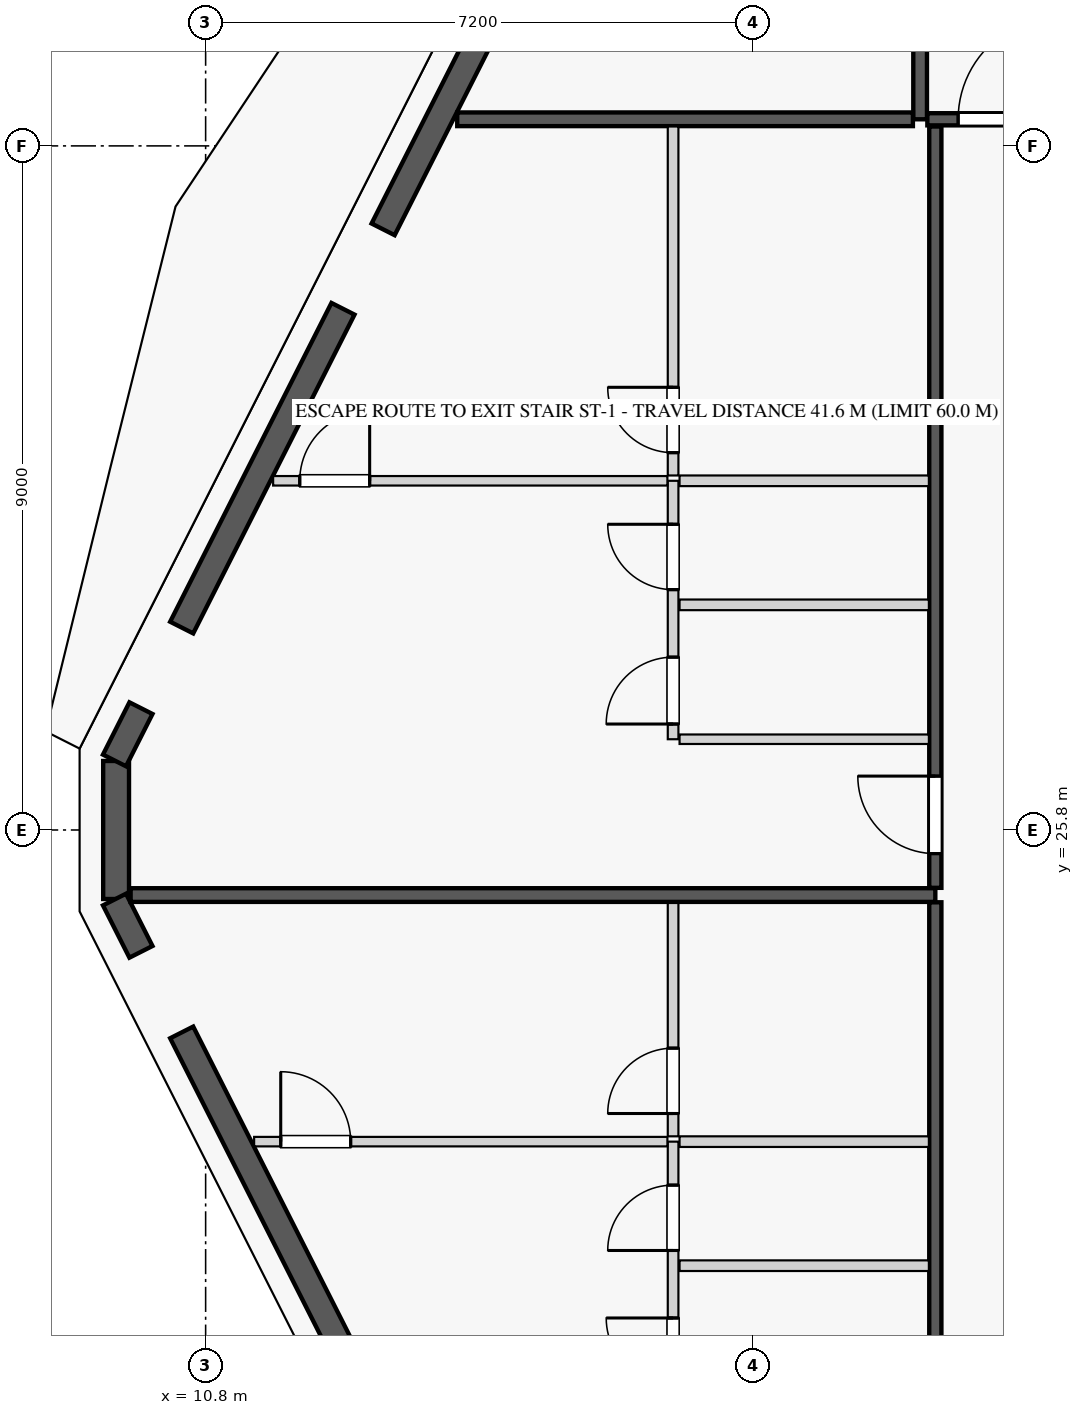
"""IFC4 building model, lengths in metres.
Left out: names, types, materials, properties, quantities, classifications, styles, units other than length and angle.
Written with IfcOpenShell. Run it as: python <this file> out.ifc"""

import sys

from ifc_helpers import new_model, si_unit, direction, frame, frame_2d, origin, origin_2d, place, context, subcontext, project, spatial, rectangle, extrude, element, fill, save


model = new_model("IFC4")
c1 = context("Model", 3, precision=1e-05, world=origin(), true_north=direction((0.0, 1.0)))
c2 = subcontext(c1, "Body", "Model", "MODEL_VIEW")
j1 = project(units=[si_unit("LENGTHUNIT", "METRE"), si_unit("PLANEANGLEUNIT", "RADIAN")], contexts=[c1])
p1 = place(None, origin())
s1 = spatial("IfcSite", under=j1, at=p1, CompositionType="ELEMENT")
p2 = place(p1, origin())
s2 = spatial("IfcBuilding", under=s1, at=p2, CompositionType="ELEMENT")
p3 = place(p2, frame((0.0, 0.0, 186.1)))
s3 = spatial("IfcBuildingStorey", under=s2, at=p3, CompositionType="ELEMENT", Elevation=186.1)
for number, where, z_axis, x_axis in (
    (1, (12.942, 33.171, 0.0), (0.0, 0.0, 1.0), (1.0, 0.0, 0.0)),
    (2, (10.253, 27.932, 0.0), (0.0, 0.0, 1.0), (1.0, 0.0, 0.0)),
    (3, (10.253, 23.668, 0.0), (0.0, 0.0, 1.0), (1.0, 0.0, 0.0)),
):
    element("IfcColumn", number, at=place(p3, frame(where, z_axis=z_axis, x_axis=x_axis)), inside=s3, PredefinedType="COLUMN", context=c2, shape_type="SweptSolid", body=[
        extrude(rectangle(XDim=0.9, YDim=0.9, at=origin_2d()), origin(), (0.0, 0.0, 1.0), 3.55),
    ])
p4 = place(p3, frame((10.253, 25.8, 0.0), z_axis=(0.0, 0.0, 1.0), x_axis=(0.0, -1.0, 0.0)))
e4 = element("IfcColumn", 4, at=p4, inside=s3, PredefinedType="PILASTER", context=c2, shape_type="SweptSolid", body=[
    extrude(rectangle(XDim=0.5, YDim=0.35, at=origin_2d()), origin(), (0.0, 0.0, 1.0), 3.55),
])
p5 = place(p3, frame((9.622, 26.708, 0.0), z_axis=(0.0, 0.0, 1.0), x_axis=(0.0, -1.0, 0.0)))
e5 = element("IfcWall", 5, at=p5, inside=s3, PredefinedType="STANDARD", context=c2, shape_type="SweptSolid", body=[
    extrude(rectangle(XDim=1.816, YDim=0.34, at=frame_2d((0.908, 0.0))), origin(), (0.0, 0.0, 1.0), 3.35),
])
p6 = place(p3, frame((15.352, 38.083, 0.0), z_axis=(0.0, 0.0, 1.0), x_axis=(-0.451524246964, -0.89225884944, 0.0)))
e6 = element("IfcWall", 6, at=p6, inside=s3, PredefinedType="STANDARD", context=c2, shape_type="SweptSolid", body=[
    extrude(rectangle(XDim=4.91, YDim=0.34, at=frame_2d((2.455, 0.0))), origin(), (0.0, 0.0, 1.0), 2.883),
])
p7 = place(p6, frame((0.968, 0.0, 0.0)))
e7 = element("IfcOpeningElement", 7, at=p7, cuts=e6, PredefinedType="OPENING", context=c2, shape_type="SweptSolid", body=[
    extrude(rectangle(XDim=1.1, YDim=2.25, at=frame_2d((0.55, 1.125))), frame((0.0, 0.18, 0.0), z_axis=(0.0, -1.0, 0.0), x_axis=(1.0, 0.0, 0.0)), (0.0, 0.0, 1.0), 0.36),
])
p8 = place(p6, frame((3.569, 0.0, 0.75)))
e8 = element("IfcOpeningElement", 8, at=p8, cuts=e6, PredefinedType="OPENING", context=c2, shape_type="SweptSolid", body=[
    extrude(rectangle(XDim=1.1, YDim=1.983, at=frame_2d((0.55, 0.991))), frame((0.0, 0.18, 0.0), z_axis=(0.0, -1.0, 0.0), x_axis=(1.0, 0.0, 0.0)), (0.0, 0.0, 1.0), 0.36),
])
p9 = place(p3, frame((12.607, 32.657, 0.0), z_axis=(0.0, 0.0, 1.0), x_axis=(-0.451426298588, -0.892308409096, 0.0)))
e9 = element("IfcWall", 9, at=p9, inside=s3, PredefinedType="STANDARD", context=c2, shape_type="SweptSolid", body=[
    extrude(rectangle(XDim=4.7, YDim=0.34, at=frame_2d((2.35, 0.0))), origin(), (0.0, 0.0, 1.0), 2.883),
])
p10 = place(p9, frame((0.607, 0.0, 0.75)))
e10 = element("IfcOpeningElement", 10, at=p10, cuts=e9, PredefinedType="OPENING", context=c2, shape_type="SweptSolid", body=[
    extrude(rectangle(XDim=1.1, YDim=1.983, at=frame_2d((0.55, 0.991))), frame((0.0, 0.18, 0.0), z_axis=(0.0, -1.0, 0.0), x_axis=(1.0, 0.0, 0.0)), (0.0, 0.0, 1.0), 0.36),
])
p11 = place(p9, frame((3.077, 0.0, 0.75)))
e11 = element("IfcOpeningElement", 11, at=p11, cuts=e9, PredefinedType="OPENING", context=c2, shape_type="SweptSolid", body=[
    extrude(rectangle(XDim=1.1, YDim=1.983, at=frame_2d((0.55, 0.991))), frame((0.0, 0.18, 0.0), z_axis=(0.0, -1.0, 0.0), x_axis=(1.0, 0.0, 0.0)), (0.0, 0.0, 1.0), 0.36),
])
for number, where, z_axis, x_axis in (
    (12, (9.949, 27.403, 0.0), (0.0, 0.0, 1.0), (-0.451, -0.892, 0.0)),
    (13, (9.601, 24.885, 0.0), (0.0, 0.0, 1.0), (0.451, -0.892, 0.0)),
):
    element("IfcWall", number, at=place(p3, frame(where, z_axis=z_axis, x_axis=x_axis)), inside=s3, PredefinedType="STANDARD", context=c2, shape_type="SweptSolid", body=[
        extrude(rectangle(XDim=0.771, YDim=0.34, at=frame_2d((0.385, 0.0))), origin(), (0.0, 0.0, 1.0), 3.35),
    ])
p12 = place(p3, frame((10.485, 23.137, 0.0), z_axis=(0.0, 0.0, 1.0), x_axis=(0.451447222193, -0.892297823361, 0.0)))
e14 = element("IfcWall", 14, at=p12, inside=s3, PredefinedType="STANDARD", context=c2, shape_type="SweptSolid", body=[
    extrude(rectangle(XDim=4.7, YDim=0.34, at=frame_2d((2.35, 0.0))), origin(), (0.0, 0.0, 1.0), 2.883),
])
p13 = place(p12, frame((0.246, 0.0, 0.75)))
e15 = element("IfcOpeningElement", 15, at=p13, cuts=e14, PredefinedType="OPENING", context=c2, shape_type="SweptSolid", body=[
    extrude(rectangle(XDim=1.1, YDim=1.983, at=frame_2d((0.55, 0.991))), frame((0.0, 0.18, 0.0), z_axis=(0.0, -1.0, 0.0), x_axis=(1.0, 0.0, 0.0)), (0.0, 0.0, 1.0), 0.36),
])
p14 = place(p12, frame((2.716, 0.0, 0.75)))
e16 = element("IfcOpeningElement", 16, at=p14, cuts=e14, PredefinedType="OPENING", context=c2, shape_type="SweptSolid", body=[
    extrude(rectangle(XDim=1.1, YDim=1.983, at=frame_2d((0.55, 0.991))), frame((0.0, 0.18, 0.0), z_axis=(0.0, -1.0, 0.0), x_axis=(1.0, 0.0, 0.0)), (0.0, 0.0, 1.0), 0.36),
])
p15 = place(p3, frame((20.2, 35.15, 0.0), z_axis=(0.0, 0.0, 1.0), x_axis=(0.0, 1.0, 0.0)))
e17 = element("IfcWall", 17, at=p15, inside=s3, PredefinedType="PARTITIONING", context=c2, shape_type="SweptSolid", body=[
    extrude(rectangle(XDim=10.482, YDim=0.18, at=frame_2d((5.241, 0.0))), origin(), (0.0, 0.0, 1.0), 3.35),
])
p16 = place(p3, frame((20.295, 35.15, 0.0), z_axis=(0.0, 0.0, 1.0), x_axis=(1.0, 0.0, 0.0)))
e18 = element("IfcWall", 18, at=p16, inside=s3, PredefinedType="PARTITIONING", context=c2, shape_type="SweptSolid", body=[
    extrude(rectangle(XDim=24.21, YDim=0.16, at=frame_2d((12.105, 0.0))), origin(), (0.0, 0.0, 1.0), 3.35),
])
p17 = place(p16, frame((0.405, 0.0, 0.0)))
e19 = element("IfcOpeningElement", 19, at=p17, cuts=e18, PredefinedType="OPENING", context=c2, shape_type="SweptSolid", body=[
    extrude(rectangle(XDim=1.35, YDim=2.35, at=frame_2d((0.675, 1.175))), frame((0.0, 0.09, 0.0), z_axis=(0.0, -1.0, 0.0), x_axis=(1.0, 0.0, 0.0)), (0.0, 0.0, 1.0), 0.18),
])
p18 = place(p3, frame((14.11, 35.15, 0.0), z_axis=(0.0, 0.0, 1.0), x_axis=(1.0, 0.0, 0.0)))
e20 = element("IfcWall", 20, at=p18, inside=s3, PredefinedType="PARTITIONING", context=c2, shape_type="SweptSolid", body=[
    extrude(rectangle(XDim=5.995, YDim=0.18, at=frame_2d((2.998, 0.0))), origin(), (0.0, 0.0, 1.0), 3.35),
])
p19 = place(p3, frame((20.4, 16.345, 0.0), z_axis=(0.0, 0.0, 1.0), x_axis=(0.0, 1.0, 0.0)))
e21 = element("IfcWall", 21, at=p19, inside=s3, PredefinedType="PARTITIONING", context=c2, shape_type="SweptSolid", body=[
    extrude(rectangle(XDim=8.504, YDim=0.16, at=frame_2d((4.252, 0.0))), origin(), (0.0, 0.0, 1.0), 3.35),
])
p20 = place(p19, frame((0.45, 0.0, 0.0)))
e22 = element("IfcOpeningElement", 22, at=p20, cuts=e21, PredefinedType="OPENING", context=c2, shape_type="SweptSolid", body=[
    extrude(rectangle(XDim=1.02, YDim=2.25, at=frame_2d((0.51, 1.125))), frame((0.0, 0.09, 0.0), z_axis=(0.0, -1.0, 0.0), x_axis=(1.0, 0.0, 0.0)), (0.0, 0.0, 1.0), 0.18),
])
p21 = place(p3, frame((16.95, 18.3, 0.0), z_axis=(0.0, 0.0, 1.0), x_axis=(0.0, 1.0, 0.0)))
e23 = element("IfcWall", 23, at=p21, inside=s3, PredefinedType="PLUMBINGWALL", context=c2, shape_type="SweptSolid", body=[
    extrude(rectangle(XDim=3.4, YDim=0.14, at=frame_2d((1.7, 0.0))), origin(), (0.0, 0.0, 1.0), 3.35),
])
p22 = place(p21, frame((0.2, 0.0, 0.0)))
e24 = element("IfcOpeningElement", 24, at=p22, cuts=e23, PredefinedType="OPENING", context=c2, shape_type="SweptSolid", body=[
    extrude(rectangle(XDim=0.88, YDim=2.15, at=frame_2d((0.44, 1.075))), frame((0.0, 0.08, 0.0), z_axis=(0.0, -1.0, 0.0), x_axis=(1.0, 0.0, 0.0)), (0.0, 0.0, 1.0), 0.16),
])
p23 = place(p21, frame((1.968, 0.0, 0.0)))
e25 = element("IfcOpeningElement", 25, at=p23, cuts=e23, PredefinedType="OPENING", context=c2, shape_type="SweptSolid", body=[
    extrude(rectangle(XDim=0.86, YDim=2.1, at=frame_2d((0.43, 1.05))), frame((0.0, 0.08, 0.0), z_axis=(0.0, -1.0, 0.0), x_axis=(1.0, 0.0, 0.0)), (0.0, 0.0, 1.0), 0.16),
])
p24 = place(p3, frame((16.95, 21.77, 0.0), z_axis=(0.0, 0.0, 1.0), x_axis=(0.0, 1.0, 0.0)))
e26 = element("IfcWall", 26, at=p24, inside=s3, PredefinedType="PLUMBINGWALL", context=c2, shape_type="SweptSolid", body=[
    extrude(rectangle(XDim=3.079, YDim=0.14, at=frame_2d((1.54, 0.0))), origin(), (0.0, 0.0, 1.0), 3.35),
])
p25 = place(p24, frame((0.3, 0.0, 0.0)))
e27 = element("IfcOpeningElement", 27, at=p25, cuts=e26, PredefinedType="OPENING", context=c2, shape_type="SweptSolid", body=[
    extrude(rectangle(XDim=0.86, YDim=2.1, at=frame_2d((0.43, 1.05))), frame((0.0, 0.08, 0.0), z_axis=(0.0, -1.0, 0.0), x_axis=(1.0, 0.0, 0.0)), (0.0, 0.0, 1.0), 0.16),
])
p26 = place(p3, frame((17.035, 21.7, 0.0), z_axis=(0.0, 0.0, 1.0), x_axis=(1.0, 0.0, 0.0)))
e28 = element("IfcWall", 28, at=p26, inside=s3, PredefinedType="PLUMBINGWALL", context=c2, shape_type="SweptSolid", body=[
    extrude(rectangle(XDim=3.28, YDim=0.14, at=frame_2d((1.64, 0.0))), origin(), (0.0, 0.0, 1.0), 3.35),
])
p27 = place(p3, frame((11.438, 21.7, 0.0), z_axis=(0.0, 0.0, 1.0), x_axis=(1.0, 0.0, 0.0)))
e29 = element("IfcWall", 29, at=p27, inside=s3, PredefinedType="PARTITIONING", context=c2, shape_type="SweptSolid", body=[
    extrude(rectangle(XDim=5.437, YDim=0.125, at=frame_2d((2.719, 0.0))), origin(), (0.0, 0.0, 1.0), 3.35),
])
p28 = place(p27, frame((0.35, 0.0, 0.0)))
e30 = element("IfcOpeningElement", 30, at=p28, cuts=e29, PredefinedType="OPENING", context=c2, shape_type="SweptSolid", body=[
    extrude(rectangle(XDim=0.92, YDim=2.15, at=frame_2d((0.46, 1.075))), frame((0.0, 0.073, 0.0), z_axis=(0.0, -1.0, 0.0), x_axis=(1.0, 0.0, 0.0)), (0.0, 0.0, 1.0), 0.145),
])
p29 = place(p3, frame((17.035, 20.068, 0.0), z_axis=(0.0, 0.0, 1.0), x_axis=(1.0, 0.0, 0.0)))
e31 = element("IfcWall", 31, at=p29, inside=s3, PredefinedType="PLUMBINGWALL", context=c2, shape_type="SweptSolid", body=[
    extrude(rectangle(XDim=3.28, YDim=0.14, at=frame_2d((1.64, 0.0))), origin(), (0.0, 0.0, 1.0), 3.35),
])
p30 = place(p3, frame((9.813, 24.944, 0.0), z_axis=(0.0, 0.0, 1.0), x_axis=(1.0, 0.0, 0.0)))
e32 = element("IfcWall", 32, at=p30, inside=s3, PredefinedType="PARTITIONING", context=c2, shape_type="SweptSolid", body=[
    extrude(rectangle(XDim=10.587, YDim=0.18, at=frame_2d((5.293, 0.0))), origin(), (0.0, 0.0, 1.0), 3.35),
])
p31 = place(p3, frame((20.4, 25.039, 0.0), z_axis=(0.0, 0.0, 1.0), x_axis=(0.0, 1.0, 0.0)))
e33 = element("IfcWall", 33, at=p31, inside=s3, PredefinedType="PARTITIONING", context=c2, shape_type="SweptSolid", body=[
    extrude(rectangle(XDim=10.016, YDim=0.16, at=frame_2d((5.008, 0.0))), origin(), (0.0, 0.0, 1.0), 3.35),
])
p32 = place(p31, frame((0.45, 0.0, 0.0)))
e34 = element("IfcOpeningElement", 34, at=p32, cuts=e33, PredefinedType="OPENING", context=c2, shape_type="SweptSolid", body=[
    extrude(rectangle(XDim=1.02, YDim=2.25, at=frame_2d((0.51, 1.125))), frame((0.0, 0.09, 0.0), z_axis=(0.0, -1.0, 0.0), x_axis=(1.0, 0.0, 0.0)), (0.0, 0.0, 1.0), 0.18),
])
p33 = place(p3, frame((17.035, 26.994, 0.0), z_axis=(0.0, 0.0, 1.0), x_axis=(1.0, 0.0, 0.0)))
e35 = element("IfcWall", 35, at=p33, inside=s3, PredefinedType="PARTITIONING", context=c2, shape_type="SweptSolid", body=[
    extrude(rectangle(XDim=3.28, YDim=0.125, at=frame_2d((1.64, 0.0))), origin(), (0.0, 0.0, 1.0), 3.35),
])
p34 = place(p3, frame((16.95, 26.994, 0.0), z_axis=(0.0, 0.0, 1.0), x_axis=(0.0, 1.0, 0.0)))
e36 = element("IfcWall", 36, at=p34, inside=s3, PredefinedType="PLUMBINGWALL", context=c2, shape_type="SweptSolid", body=[
    extrude(rectangle(XDim=3.4, YDim=0.14, at=frame_2d((1.7, 0.0))), origin(), (0.0, 0.0, 1.0), 3.35),
])
p35 = place(p34, frame((0.2, 0.0, 0.0)))
e37 = element("IfcOpeningElement", 37, at=p35, cuts=e36, PredefinedType="OPENING", context=c2, shape_type="SweptSolid", body=[
    extrude(rectangle(XDim=0.88, YDim=2.15, at=frame_2d((0.44, 1.075))), frame((0.0, 0.08, 0.0), z_axis=(0.0, -1.0, 0.0), x_axis=(1.0, 0.0, 0.0)), (0.0, 0.0, 1.0), 0.16),
])
p36 = place(p34, frame((1.968, 0.0, 0.0)))
e38 = element("IfcOpeningElement", 38, at=p36, cuts=e36, PredefinedType="OPENING", context=c2, shape_type="SweptSolid", body=[
    extrude(rectangle(XDim=0.86, YDim=2.1, at=frame_2d((0.43, 1.05))), frame((0.0, 0.08, 0.0), z_axis=(0.0, -1.0, 0.0), x_axis=(1.0, 0.0, 0.0)), (0.0, 0.0, 1.0), 0.16),
])
p37 = place(p3, frame((16.95, 30.464, 0.0), z_axis=(0.0, 0.0, 1.0), x_axis=(0.0, 1.0, 0.0)))
e39 = element("IfcWall", 39, at=p37, inside=s3, PredefinedType="PLUMBINGWALL", context=c2, shape_type="SweptSolid", body=[
    extrude(rectangle(XDim=4.591, YDim=0.14, at=frame_2d((2.295, 0.0))), origin(), (0.0, 0.0, 1.0), 3.35),
])
p38 = place(p37, frame((0.3, 0.0, 0.0)))
e40 = element("IfcOpeningElement", 40, at=p38, cuts=e39, PredefinedType="OPENING", context=c2, shape_type="SweptSolid", body=[
    extrude(rectangle(XDim=0.86, YDim=2.1, at=frame_2d((0.43, 1.05))), frame((0.0, 0.08, 0.0), z_axis=(0.0, -1.0, 0.0), x_axis=(1.0, 0.0, 0.0)), (0.0, 0.0, 1.0), 0.16),
])
p39 = place(p3, frame((17.035, 30.394, 0.0), z_axis=(0.0, 0.0, 1.0), x_axis=(1.0, 0.0, 0.0)))
e41 = element("IfcWall", 41, at=p39, inside=s3, PredefinedType="PLUMBINGWALL", context=c2, shape_type="SweptSolid", body=[
    extrude(rectangle(XDim=3.28, YDim=0.14, at=frame_2d((1.64, 0.0))), origin(), (0.0, 0.0, 1.0), 3.35),
])
p40 = place(p3, frame((11.688, 30.394, 0.0), z_axis=(0.0, 0.0, 1.0), x_axis=(1.0, 0.0, 0.0)))
e42 = element("IfcWall", 42, at=p40, inside=s3, PredefinedType="PARTITIONING", context=c2, shape_type="SweptSolid", body=[
    extrude(rectangle(XDim=5.187, YDim=0.125, at=frame_2d((2.594, 0.0))), origin(), (0.0, 0.0, 1.0), 3.35),
])
p41 = place(p40, frame((0.35, 0.0, 0.0)))
e43 = element("IfcOpeningElement", 43, at=p41, cuts=e42, PredefinedType="OPENING", context=c2, shape_type="SweptSolid", body=[
    extrude(rectangle(XDim=0.92, YDim=2.15, at=frame_2d((0.46, 1.075))), frame((0.0, 0.073, 0.0), z_axis=(0.0, -1.0, 0.0), x_axis=(1.0, 0.0, 0.0)), (0.0, 0.0, 1.0), 0.145),
])
p42 = place(p3, frame((17.035, 28.762, 0.0), z_axis=(0.0, 0.0, 1.0), x_axis=(1.0, 0.0, 0.0)))
e44 = element("IfcWall", 44, at=p42, inside=s3, PredefinedType="PLUMBINGWALL", context=c2, shape_type="SweptSolid", body=[
    extrude(rectangle(XDim=3.28, YDim=0.14, at=frame_2d((1.64, 0.0))), origin(), (0.0, 0.0, 1.0), 3.35),
])
p43 = place(p10, origin())
e45 = element("IfcWindow", 45, at=p43, inside=s3, PartitioningType="SINGLE_PANEL", PredefinedType="WINDOW", context=c2, shape_type="SweptSolid", body=[
    extrude(rectangle(XDim=1.1, YDim=1.983, at=frame_2d((0.55, 0.991))), frame((0.0, 0.03, 0.0), z_axis=(0.0, -1.0, 0.0), x_axis=(1.0, 0.0, 0.0)), (0.0, 0.0, 1.0), 0.06),
])
fill(e10, e45)
p44 = place(p13, origin())
e46 = element("IfcWindow", 46, at=p44, inside=s3, PartitioningType="SINGLE_PANEL", PredefinedType="WINDOW", context=c2, shape_type="SweptSolid", body=[
    extrude(rectangle(XDim=1.1, YDim=1.983, at=frame_2d((0.55, 0.991))), frame((0.0, 0.03, 0.0), z_axis=(0.0, -1.0, 0.0), x_axis=(1.0, 0.0, 0.0)), (0.0, 0.0, 1.0), 0.06),
])
fill(e15, e46)
p45 = place(p17, origin())
e47 = element("IfcDoor", 47, at=p45, inside=s3, OperationType="SINGLE_SWING_RIGHT", PredefinedType="DOOR", context=c2, shape_type="SweptSolid", body=[
    extrude(rectangle(XDim=1.35, YDim=2.35, at=frame_2d((0.675, 1.175))), frame((0.0, 0.025, 0.0), z_axis=(0.0, -1.0, 0.0), x_axis=(1.0, 0.0, 0.0)), (0.0, 0.0, 1.0), 0.05),
])
fill(e19, e47)
p46 = place(p22, origin())
e48 = element("IfcDoor", 48, at=p46, inside=s3, OperationType="SINGLE_SWING_RIGHT", PredefinedType="DOOR", context=c2, shape_type="SweptSolid", body=[
    extrude(rectangle(XDim=0.88, YDim=2.15, at=frame_2d((0.44, 1.075))), frame((0.0, 0.025, 0.0), z_axis=(0.0, -1.0, 0.0), x_axis=(1.0, 0.0, 0.0)), (0.0, 0.0, 1.0), 0.05),
])
fill(e24, e48)
p47 = place(p23, origin())
e49 = element("IfcDoor", 49, at=p47, inside=s3, OperationType="SINGLE_SWING_LEFT", PredefinedType="DOOR", context=c2, shape_type="SweptSolid", body=[
    extrude(rectangle(XDim=0.86, YDim=2.1, at=frame_2d((0.43, 1.05))), frame((0.0, 0.025, 0.0), z_axis=(0.0, -1.0, 0.0), x_axis=(1.0, 0.0, 0.0)), (0.0, 0.0, 1.0), 0.05),
])
fill(e25, e49)
p48 = place(p25, origin())
e50 = element("IfcDoor", 50, at=p48, inside=s3, OperationType="SINGLE_SWING_LEFT", PredefinedType="DOOR", context=c2, shape_type="SweptSolid", body=[
    extrude(rectangle(XDim=0.86, YDim=2.1, at=frame_2d((0.43, 1.05))), frame((0.0, 0.025, 0.0), z_axis=(0.0, -1.0, 0.0), x_axis=(1.0, 0.0, 0.0)), (0.0, 0.0, 1.0), 0.05),
])
fill(e27, e50)
p49 = place(p28, origin())
e51 = element("IfcDoor", 51, at=p49, inside=s3, OperationType="SINGLE_SWING_LEFT", PredefinedType="DOOR", context=c2, shape_type="SweptSolid", body=[
    extrude(rectangle(XDim=0.92, YDim=2.15, at=frame_2d((0.46, 1.075))), frame((0.0, 0.025, 0.0), z_axis=(0.0, -1.0, 0.0), x_axis=(1.0, 0.0, 0.0)), (0.0, 0.0, 1.0), 0.05),
])
fill(e30, e51)
p50 = place(p35, origin())
e52 = element("IfcDoor", 52, at=p50, inside=s3, OperationType="SINGLE_SWING_LEFT", PredefinedType="DOOR", context=c2, shape_type="SweptSolid", body=[
    extrude(rectangle(XDim=0.88, YDim=2.15, at=frame_2d((0.44, 1.075))), frame((0.0, 0.025, 0.0), z_axis=(0.0, -1.0, 0.0), x_axis=(1.0, 0.0, 0.0)), (0.0, 0.0, 1.0), 0.05),
])
fill(e37, e52)
p51 = place(p36, origin())
e53 = element("IfcDoor", 53, at=p51, inside=s3, OperationType="SINGLE_SWING_RIGHT", PredefinedType="DOOR", context=c2, shape_type="SweptSolid", body=[
    extrude(rectangle(XDim=0.86, YDim=2.1, at=frame_2d((0.43, 1.05))), frame((0.0, 0.025, 0.0), z_axis=(0.0, -1.0, 0.0), x_axis=(1.0, 0.0, 0.0)), (0.0, 0.0, 1.0), 0.05),
])
fill(e38, e53)
p52 = place(p38, origin())
e54 = element("IfcDoor", 54, at=p52, inside=s3, OperationType="SINGLE_SWING_RIGHT", PredefinedType="DOOR", context=c2, shape_type="SweptSolid", body=[
    extrude(rectangle(XDim=0.86, YDim=2.1, at=frame_2d((0.43, 1.05))), frame((0.0, 0.025, 0.0), z_axis=(0.0, -1.0, 0.0), x_axis=(1.0, 0.0, 0.0)), (0.0, 0.0, 1.0), 0.05),
])
fill(e40, e54)
p53 = place(p32, origin())
e55 = element("IfcDoor", 55, at=p53, inside=s3, OperationType="SINGLE_SWING_RIGHT", PredefinedType="DOOR", context=c2, shape_type="SweptSolid", body=[
    extrude(rectangle(XDim=1.02, YDim=2.25, at=frame_2d((0.51, 1.125))), frame((0.0, 0.025, 0.0), z_axis=(0.0, -1.0, 0.0), x_axis=(1.0, 0.0, 0.0)), (0.0, 0.0, 1.0), 0.05),
])
fill(e34, e55)
p54 = place(p41, origin())
e56 = element("IfcDoor", 56, at=p54, inside=s3, OperationType="SINGLE_SWING_RIGHT", PredefinedType="DOOR", context=c2, shape_type="SweptSolid", body=[
    extrude(rectangle(XDim=0.92, YDim=2.15, at=frame_2d((0.46, 1.075))), frame((0.0, 0.025, 0.0), z_axis=(0.0, -1.0, 0.0), x_axis=(1.0, 0.0, 0.0)), (0.0, 0.0, 1.0), 0.05),
])
fill(e43, e56)
p55 = place(p8, origin())
e57 = element("IfcWindow", 57, at=p55, inside=s3, PartitioningType="SINGLE_PANEL", PredefinedType="WINDOW", context=c2, shape_type="SweptSolid", body=[
    extrude(rectangle(XDim=1.1, YDim=1.983, at=frame_2d((0.55, 0.991))), frame((0.0, 0.03, 0.0), z_axis=(0.0, -1.0, 0.0), x_axis=(1.0, 0.0, 0.0)), (0.0, 0.0, 1.0), 0.06),
])
fill(e8, e57)
p56 = place(p11, origin())
e58 = element("IfcWindow", 58, at=p56, inside=s3, PartitioningType="SINGLE_PANEL", PredefinedType="WINDOW", context=c2, shape_type="SweptSolid", body=[
    extrude(rectangle(XDim=1.1, YDim=1.983, at=frame_2d((0.55, 0.991))), frame((0.0, 0.03, 0.0), z_axis=(0.0, -1.0, 0.0), x_axis=(1.0, 0.0, 0.0)), (0.0, 0.0, 1.0), 0.06),
])
fill(e11, e58)
p57 = place(p14, origin())
e59 = element("IfcWindow", 59, at=p57, inside=s3, PartitioningType="SINGLE_PANEL", PredefinedType="WINDOW", context=c2, shape_type="SweptSolid", body=[
    extrude(rectangle(XDim=1.1, YDim=1.983, at=frame_2d((0.55, 0.991))), frame((0.0, 0.03, 0.0), z_axis=(0.0, -1.0, 0.0), x_axis=(1.0, 0.0, 0.0)), (0.0, 0.0, 1.0), 0.06),
])
fill(e16, e59)
save(model, sys.argv[1])
